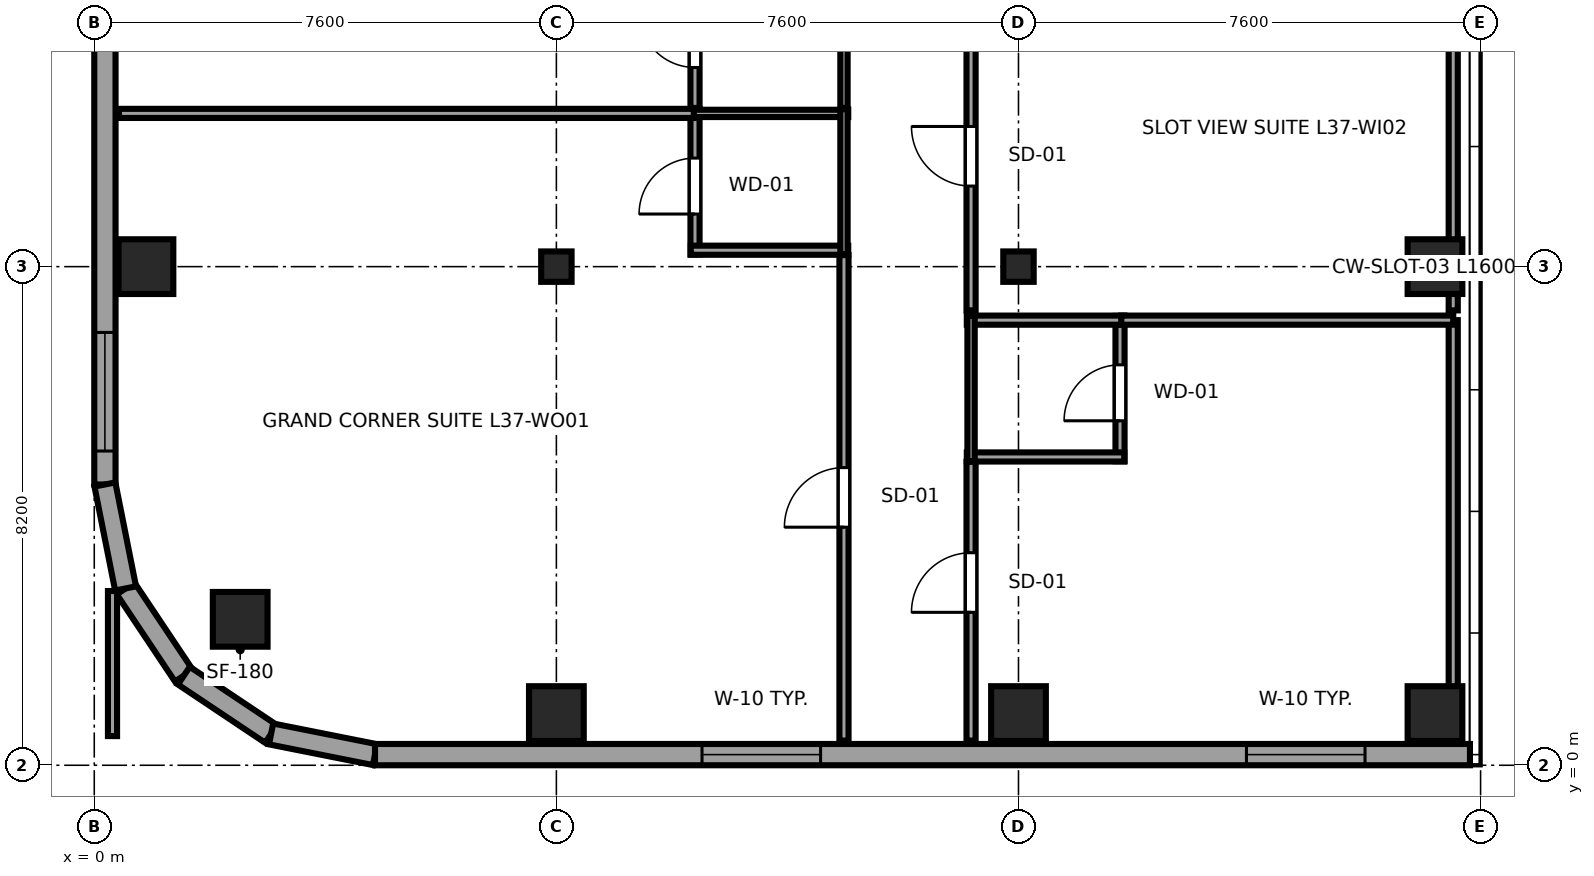
"""IFC4 building model, lengths in metres.
Left out: names, types, materials, properties, quantities, classifications, styles, units other than length and angle.
Written with IfcOpenShell. Run it as: python <this file> out.ifc"""

import sys

from ifc_helpers import new_model, si_unit, direction, frame, frame_2d, origin, origin_2d, place, context, subcontext, project, spatial, rectangle, i_section, extrude, source, transform, mapped, element, fill, save


model = new_model("IFC4")
c1 = context("Model", 3, precision=1e-05, world=origin(), true_north=direction((0.0, 1.0)))
c2 = subcontext(c1, "Body", "Model", "MODEL_VIEW")
j1 = project(units=[si_unit("LENGTHUNIT", "METRE"), si_unit("PLANEANGLEUNIT", "RADIAN")], contexts=[c1])
p1 = place(None, origin())
s1 = spatial("IfcSite", under=j1, at=p1, CompositionType="ELEMENT")
p2 = place(p1, origin())
s2 = spatial("IfcBuilding", under=s1, at=p2, CompositionType="ELEMENT")
p3 = place(p2, frame((0.0, 0.0, 143.5)))
s3 = spatial("IfcBuildingStorey", under=s2, at=p3, CompositionType="ELEMENT", Elevation=143.5)
m1 = source(origin(), c2, "Body", "SweptSolid", [
    extrude(rectangle(XDim=0.9, YDim=0.9, at=origin_2d()), origin(), (0.0, 0.0, 1.0), 3.55),
])
for number, where, z_axis, x_axis in (
    (1, (2.4, 2.4, 0.0), (0.0, 0.0, 1.0), (1.0, 0.0, 0.0)),
    (2, (0.85, 8.2, 0.0), (0.0, 0.0, 1.0), (1.0, 0.0, 0.0)),
    (3, (7.6, 0.85, 0.0), (0.0, 0.0, 1.0), (1.0, 0.0, 0.0)),
):
    element("IfcColumn", number, at=place(p3, frame(where, z_axis=z_axis, x_axis=x_axis)), inside=s3, PredefinedType="COLUMN", context=c2, shape_type="MappedRepresentation", body=[
        mapped(m1, transform((0.0, 0.0, 0.0), x_axis=(1.0, 0.0, 0.0), y_axis=(0.0, 1.0, 0.0), z_axis=(0.0, 0.0, 1.0), scale=1.0)),
    ])
m2 = source(origin(), c2, "Body", "SweptSolid", [
    extrude(i_section(OverallWidth=0.5, OverallDepth=0.5, WebThickness=0.022, FlangeThickness=0.034, at=origin_2d()), origin(), (0.0, 0.0, 1.0), 3.55),
])
p4 = place(p3, frame((7.6, 8.2, 0.0), z_axis=(0.0, 0.0, 1.0), x_axis=(1.0, 0.0, 0.0)))
e4 = element("IfcColumn", 4, at=p4, inside=s3, PredefinedType="COLUMN", context=c2, shape_type="MappedRepresentation", body=[
    mapped(m2, transform((0.0, 0.0, 0.0), x_axis=(1.0, 0.0, 0.0), y_axis=(0.0, 1.0, 0.0), z_axis=(0.0, 0.0, 1.0), scale=1.0)),
])
p5 = place(p3, frame((15.2, 0.85, 0.0), z_axis=(0.0, 0.0, 1.0), x_axis=(1.0, 0.0, 0.0)))
e5 = element("IfcColumn", 5, at=p5, inside=s3, PredefinedType="COLUMN", context=c2, shape_type="MappedRepresentation", body=[
    mapped(m1, transform((0.0, 0.0, 0.0), x_axis=(1.0, 0.0, 0.0), y_axis=(0.0, 1.0, 0.0), z_axis=(0.0, 0.0, 1.0), scale=1.0)),
])
p6 = place(p3, frame((15.2, 8.2, 0.0), z_axis=(0.0, 0.0, 1.0), x_axis=(1.0, 0.0, 0.0)))
e6 = element("IfcColumn", 6, at=p6, inside=s3, PredefinedType="COLUMN", context=c2, shape_type="MappedRepresentation", body=[
    mapped(m2, transform((0.0, 0.0, 0.0), x_axis=(1.0, 0.0, 0.0), y_axis=(0.0, 1.0, 0.0), z_axis=(0.0, 0.0, 1.0), scale=1.0)),
])
for number, where, z_axis, x_axis in (
    (7, (22.05, 0.85, 0.0), (0.0, 0.0, 1.0), (1.0, 0.0, 0.0)),
    (8, (22.05, 8.2, 0.0), (0.0, 0.0, 1.0), (1.0, 0.0, 0.0)),
):
    element("IfcColumn", number, at=place(p3, frame(where, z_axis=z_axis, x_axis=x_axis)), inside=s3, PredefinedType="COLUMN", context=c2, shape_type="MappedRepresentation", body=[
        mapped(m1, transform((0.0, 0.0, 0.0), x_axis=(1.0, 0.0, 0.0), y_axis=(0.0, 1.0, 0.0), z_axis=(0.0, 0.0, 1.0), scale=1.0)),
    ])
p7 = place(p3, frame((0.515, 2.908, 0.0), z_axis=(0.0, 0.0, 1.0), x_axis=(0.55554893791, -0.831483840845, 0.0)))
e9 = element("IfcWall", 9, at=p7, inside=s3, PredefinedType="SOLIDWALL", context=c2, shape_type="SweptSolid", body=[
    extrude(rectangle(XDim=1.725, YDim=0.35, at=frame_2d((0.863, 0.0))), origin(), (0.0, 0.0, 1.0), 2.08),
])
p8 = place(p3, frame((1.473, 1.473, 0.0), z_axis=(0.0, 0.0, 1.0), x_axis=(0.831483840845, -0.55554893791, 0.0)))
e10 = element("IfcWall", 10, at=p8, inside=s3, PredefinedType="SOLIDWALL", context=c2, shape_type="SweptSolid", body=[
    extrude(rectangle(XDim=1.725, YDim=0.35, at=frame_2d((0.863, 0.0))), origin(), (0.0, 0.0, 1.0), 3.29),
])
p9 = place(p3, frame((2.908, 0.515, 0.0), z_axis=(0.0, 0.0, 1.0), x_axis=(0.980800971659, -0.195011420161, 0.0)))
e11 = element("IfcWall", 11, at=p9, inside=s3, PredefinedType="SOLIDWALL", context=c2, shape_type="SweptSolid", body=[
    extrude(rectangle(XDim=1.743, YDim=0.35, at=frame_2d((0.871, 0.0))), origin(), (0.0, 0.0, 1.0), 3.29),
])
p10 = place(p3, frame((4.617, 0.175, 0.0), z_axis=(0.0, 0.0, 1.0), x_axis=(1.0, 0.0, 0.0)))
e12 = element("IfcWall", 12, at=p10, inside=s3, PredefinedType="SOLIDWALL", context=c2, shape_type="SweptSolid", body=[
    extrude(rectangle(XDim=18.008, YDim=0.35, at=frame_2d((9.004, 0.0))), origin(), (0.0, 0.0, 1.0), 3.29),
])
p11 = place(p10, frame((5.378, 0.0, 0.68)))
e13 = element("IfcOpeningElement", 13, at=p11, cuts=e12, PredefinedType="OPENING", context=c2, shape_type="SweptSolid", body=[
    extrude(rectangle(XDim=1.95, YDim=1.82, at=frame_2d((0.975, 0.91))), frame((0.0, 0.185, 0.0), z_axis=(0.0, -1.0, 0.0), x_axis=(1.0, 0.0, 0.0)), (0.0, 0.0, 1.0), 0.37),
])
p12 = place(p10, frame((14.332, 0.0, 0.68)))
e14 = element("IfcOpeningElement", 14, at=p12, cuts=e12, PredefinedType="OPENING", context=c2, shape_type="SweptSolid", body=[
    extrude(rectangle(XDim=1.95, YDim=1.82, at=frame_2d((0.975, 0.91))), frame((0.0, 0.185, 0.0), z_axis=(0.0, -1.0, 0.0), x_axis=(1.0, 0.0, 0.0)), (0.0, 0.0, 1.0), 0.37),
])
p13 = place(p3, frame((0.175, 41.383, 0.0), z_axis=(0.0, 0.0, 1.0), x_axis=(0.0, -1.0, 0.0)))
e15 = element("IfcWall", 15, at=p13, inside=s3, PredefinedType="SOLIDWALL", context=c2, shape_type="SweptSolid", body=[
    extrude(rectangle(XDim=36.766, YDim=0.35, at=frame_2d((18.383, 0.0))), origin(), (0.0, 0.0, 1.0), 3.29),
])
p14 = place(p13, frame((0.551, 0.0, 0.68)))
e16 = element("IfcOpeningElement", 16, at=p14, cuts=e15, PredefinedType="OPENING", context=c2, shape_type="SweptSolid", body=[
    extrude(rectangle(XDim=1.95, YDim=1.82, at=frame_2d((0.975, 0.91))), frame((0.0, 0.185, 0.0), z_axis=(0.0, -1.0, 0.0), x_axis=(1.0, 0.0, 0.0)), (0.0, 0.0, 1.0), 0.37),
])
p15 = place(p13, frame((4.503, 0.0, 0.68)))
e17 = element("IfcOpeningElement", 17, at=p15, cuts=e15, PredefinedType="OPENING", context=c2, shape_type="SweptSolid", body=[
    extrude(rectangle(XDim=1.95, YDim=1.82, at=frame_2d((0.975, 0.91))), frame((0.0, 0.185, 0.0), z_axis=(0.0, -1.0, 0.0), x_axis=(1.0, 0.0, 0.0)), (0.0, 0.0, 1.0), 0.37),
])
p16 = place(p13, frame((10.554, 0.0, 0.68)))
e18 = element("IfcOpeningElement", 18, at=p16, cuts=e15, PredefinedType="OPENING", context=c2, shape_type="SweptSolid", body=[
    extrude(rectangle(XDim=1.95, YDim=1.82, at=frame_2d((0.975, 0.91))), frame((0.0, 0.185, 0.0), z_axis=(0.0, -1.0, 0.0), x_axis=(1.0, 0.0, 0.0)), (0.0, 0.0, 1.0), 0.37),
])
p17 = place(p13, frame((13.456, 0.0, 0.68)))
e19 = element("IfcOpeningElement", 19, at=p17, cuts=e15, PredefinedType="OPENING", context=c2, shape_type="SweptSolid", body=[
    extrude(rectangle(XDim=1.95, YDim=1.82, at=frame_2d((0.975, 0.91))), frame((0.0, 0.185, 0.0), z_axis=(0.0, -1.0, 0.0), x_axis=(1.0, 0.0, 0.0)), (0.0, 0.0, 1.0), 0.37),
])
p18 = place(p13, frame((21.36, 0.0, 0.68)))
e20 = element("IfcOpeningElement", 20, at=p18, cuts=e15, PredefinedType="OPENING", context=c2, shape_type="SweptSolid", body=[
    extrude(rectangle(XDim=1.95, YDim=1.82, at=frame_2d((0.975, 0.91))), frame((0.0, 0.185, 0.0), z_axis=(0.0, -1.0, 0.0), x_axis=(1.0, 0.0, 0.0)), (0.0, 0.0, 1.0), 0.37),
])
p19 = place(p13, frame((26.361, 0.0, 0.68)))
e21 = element("IfcOpeningElement", 21, at=p19, cuts=e15, PredefinedType="OPENING", context=c2, shape_type="SweptSolid", body=[
    extrude(rectangle(XDim=1.95, YDim=1.82, at=frame_2d((0.975, 0.91))), frame((0.0, 0.185, 0.0), z_axis=(0.0, -1.0, 0.0), x_axis=(1.0, 0.0, 0.0)), (0.0, 0.0, 1.0), 0.37),
])
p20 = place(p13, frame((34.265, 0.0, 0.68)))
e22 = element("IfcOpeningElement", 22, at=p20, cuts=e15, PredefinedType="OPENING", context=c2, shape_type="SweptSolid", body=[
    extrude(rectangle(XDim=1.95, YDim=1.82, at=frame_2d((0.975, 0.91))), frame((0.0, 0.185, 0.0), z_axis=(0.0, -1.0, 0.0), x_axis=(1.0, 0.0, 0.0)), (0.0, 0.0, 1.0), 0.37),
])
p21 = place(p3, frame((0.175, 4.617, 0.0), z_axis=(0.0, 0.0, 1.0), x_axis=(0.195011420161, -0.980800971659, 0.0)))
e23 = element("IfcWall", 23, at=p21, inside=s3, PredefinedType="SOLIDWALL", context=c2, shape_type="SweptSolid", body=[
    extrude(rectangle(XDim=1.743, YDim=0.35, at=frame_2d((0.871, 0.0))), origin(), (0.0, 0.0, 1.0), 2.08),
])
p22 = place(p3, frame((9.88, 8.4, 0.0), z_axis=(0.0, 0.0, 1.0), x_axis=(0.0, 1.0, 0.0)))
e24 = element("IfcWall", 24, at=p22, inside=s3, PredefinedType="PARTITIONING", context=c2, shape_type="SweptSolid", body=[
    extrude(rectangle(XDim=2.39, YDim=0.15, at=frame_2d((1.195, 0.0))), origin(), (0.0, 0.0, 1.0), 3.29),
])
p23 = place(p22, frame((0.665, 0.0, 0.0)))
e25 = element("IfcOpeningElement", 25, at=p23, cuts=e24, PredefinedType="OPENING", context=c2, shape_type="SweptSolid", body=[
    extrude(rectangle(XDim=0.92, YDim=2.01, at=frame_2d((0.46, 1.005))), frame((0.0, 0.085, 0.0), z_axis=(0.0, -1.0, 0.0), x_axis=(1.0, 0.0, 0.0)), (0.0, 0.0, 1.0), 0.17),
])
p24 = place(p3, frame((9.81, 8.47, 0.0), z_axis=(0.0, 0.0, 1.0), x_axis=(1.0, 0.0, 0.0)))
e26 = element("IfcWall", 26, at=p24, inside=s3, PredefinedType="PARTITIONING", context=c2, shape_type="SweptSolid", body=[
    extrude(rectangle(XDim=2.59, YDim=0.15, at=frame_2d((1.295, 0.0))), origin(), (0.0, 0.0, 1.0), 2.08),
])
p25 = place(p3, frame((9.81, 10.72, 0.0), z_axis=(0.0, 0.0, 1.0), x_axis=(1.0, 0.0, 0.0)))
e27 = element("IfcWall", 27, at=p25, inside=s3, PredefinedType="PLUMBINGWALL", context=c2, shape_type="SweptSolid", body=[
    extrude(rectangle(XDim=2.59, YDim=0.12, at=frame_2d((1.295, 0.0))), origin(), (0.0, 0.0, 1.0), 3.29),
])
p26 = place(p3, frame((12.33, 8.4, 0.0), z_axis=(0.0, 0.0, 1.0), x_axis=(0.0, 1.0, 0.0)))
e28 = element("IfcWall", 28, at=p26, inside=s3, PredefinedType="PLUMBINGWALL", context=c2, shape_type="SweptSolid", body=[
    extrude(rectangle(XDim=2.39, YDim=0.12, at=frame_2d((1.195, 0.0))), origin(), (0.0, 0.0, 1.0), 3.29),
])
p27 = place(p3, frame((9.88, 10.81, 0.0), z_axis=(0.0, 0.0, 1.0), x_axis=(0.0, 1.0, 0.0)))
e29 = element("IfcWall", 29, at=p27, inside=s3, PredefinedType="PARTITIONING", context=c2, shape_type="SweptSolid", body=[
    extrude(rectangle(XDim=2.39, YDim=0.15, at=frame_2d((1.195, 0.0))), origin(), (0.0, 0.0, 1.0), 3.29),
])
p28 = place(p27, frame((0.665, 0.0, 0.0)))
e30 = element("IfcOpeningElement", 30, at=p28, cuts=e29, PredefinedType="OPENING", context=c2, shape_type="SweptSolid", body=[
    extrude(rectangle(XDim=0.92, YDim=2.01, at=frame_2d((0.46, 1.005))), frame((0.0, 0.085, 0.0), z_axis=(0.0, -1.0, 0.0), x_axis=(1.0, 0.0, 0.0)), (0.0, 0.0, 1.0), 0.17),
])
p29 = place(p3, frame((12.33, 10.81, 0.0), z_axis=(0.0, 0.0, 1.0), x_axis=(0.0, 1.0, 0.0)))
e31 = element("IfcWall", 31, at=p29, inside=s3, PredefinedType="PLUMBINGWALL", context=c2, shape_type="SweptSolid", body=[
    extrude(rectangle(XDim=2.39, YDim=0.12, at=frame_2d((1.195, 0.0))), origin(), (0.0, 0.0, 1.0), 3.29),
])
p30 = place(p3, frame((16.87, 5.0, 0.0), z_axis=(0.0, 0.0, 1.0), x_axis=(0.0, 1.0, 0.0)))
e32 = element("IfcWall", 32, at=p30, inside=s3, PredefinedType="PARTITIONING", context=c2, shape_type="SweptSolid", body=[
    extrude(rectangle(XDim=2.39, YDim=0.15, at=frame_2d((1.195, 0.0))), origin(), (0.0, 0.0, 1.0), 3.29),
])
p31 = place(p30, frame((0.665, 0.0, 0.0)))
e33 = element("IfcOpeningElement", 33, at=p31, cuts=e32, PredefinedType="OPENING", context=c2, shape_type="SweptSolid", body=[
    extrude(rectangle(XDim=0.92, YDim=2.01, at=frame_2d((0.46, 1.005))), frame((0.0, 0.085, 0.0), z_axis=(0.0, -1.0, 0.0), x_axis=(1.0, 0.0, 0.0)), (0.0, 0.0, 1.0), 0.17),
])
for number, where, z_axis, x_axis in (
    (34, (14.35, 5.07, 0.0), (0.0, 0.0, 1.0), (1.0, 0.0, 0.0)),
    (35, (14.35, 7.32, 0.0), (0.0, 0.0, 1.0), (1.0, 0.0, 0.0)),
):
    element("IfcWall", number, at=place(p3, frame(where, z_axis=z_axis, x_axis=x_axis)), inside=s3, PredefinedType="PARTITIONING", context=c2, shape_type="SweptSolid", body=[
        extrude(rectangle(XDim=2.59, YDim=0.15, at=frame_2d((1.295, 0.0))), origin(), (0.0, 0.0, 1.0), 3.29),
    ])
p32 = place(p3, frame((14.42, 5.0, 0.0), z_axis=(0.0, 0.0, 1.0), x_axis=(0.0, 1.0, 0.0)))
e36 = element("IfcWall", 36, at=p32, inside=s3, PredefinedType="PLUMBINGWALL", context=c2, shape_type="SweptSolid", body=[
    extrude(rectangle(XDim=2.39, YDim=0.12, at=frame_2d((1.195, 0.0))), origin(), (0.0, 0.0, 1.0), 3.29),
])
p33 = place(p3, frame((12.33, 0.405, 0.0), z_axis=(0.0, 0.0, 1.0), x_axis=(0.0, 1.0, 0.0)))
e37 = element("IfcWall", 37, at=p33, inside=s3, PredefinedType="PARTITIONING", context=c2, shape_type="SweptSolid", body=[
    extrude(rectangle(XDim=7.985, YDim=0.15, at=frame_2d((3.992, 0.0))), origin(), (0.0, 0.0, 1.0), 3.29),
])
p34 = place(p33, frame((3.51, 0.0, 0.0)))
e38 = element("IfcOpeningElement", 38, at=p34, cuts=e37, PredefinedType="OPENING", context=c2, shape_type="SweptSolid", body=[
    extrude(rectangle(XDim=0.98, YDim=2.12, at=frame_2d((0.49, 1.06))), frame((0.0, 0.085, 0.0), z_axis=(0.0, -1.0, 0.0), x_axis=(1.0, 0.0, 0.0)), (0.0, 0.0, 1.0), 0.17),
])
p35 = place(p3, frame((0.405, 10.72, 0.0), z_axis=(0.0, 0.0, 1.0), x_axis=(1.0, 0.0, 0.0)))
e39 = element("IfcWall", 39, at=p35, inside=s3, PredefinedType="PARTITIONING", context=c2, shape_type="SweptSolid", body=[
    extrude(rectangle(XDim=9.455, YDim=0.15, at=frame_2d((4.728, 0.0))), origin(), (0.0, 0.0, 1.0), 3.29),
])
p36 = place(p3, frame((0.3, 0.48, 0.0), z_axis=(0.0, 0.0, 1.0), x_axis=(0.0, 1.0, 0.0)))
e40 = element("IfcWall", 40, at=p36, inside=s3, PredefinedType="PARTITIONING", context=c2, shape_type="SweptSolid", body=[
    extrude(rectangle(XDim=2.385, YDim=0.15, at=frame_2d((1.192, 0.0))), origin(), (0.0, 0.0, 1.0), 3.29),
])
p37 = place(p3, frame((14.42, 0.405, 0.0), z_axis=(0.0, 0.0, 1.0), x_axis=(0.0, 1.0, 0.0)))
e41 = element("IfcWall", 41, at=p37, inside=s3, PredefinedType="PARTITIONING", context=c2, shape_type="SweptSolid", body=[
    extrude(rectangle(XDim=4.585, YDim=0.15, at=frame_2d((2.292, 0.0))), origin(), (0.0, 0.0, 1.0), 3.29),
])
p38 = place(p37, frame((2.11, 0.0, 0.0)))
e42 = element("IfcOpeningElement", 42, at=p38, cuts=e41, PredefinedType="OPENING", context=c2, shape_type="SweptSolid", body=[
    extrude(rectangle(XDim=0.98, YDim=2.12, at=frame_2d((0.49, 1.06))), frame((0.0, 0.085, 0.0), z_axis=(0.0, -1.0, 0.0), x_axis=(1.0, 0.0, 0.0)), (0.0, 0.0, 1.0), 0.17),
])
p39 = place(p3, frame((22.35, 0.405, 0.0), z_axis=(0.0, 0.0, 1.0), x_axis=(0.0, 1.0, 0.0)))
e43 = element("IfcWall", 43, at=p39, inside=s3, PredefinedType="PARTITIONING", context=c2, shape_type="SweptSolid", body=[
    extrude(rectangle(XDim=6.915, YDim=0.15, at=frame_2d((3.458, 0.0))), origin(), (0.0, 0.0, 1.0), 2.08),
])
p40 = place(p3, frame((16.89, 7.32, 0.0), z_axis=(0.0, 0.0, 1.0), x_axis=(1.0, 0.0, 0.0)))
e44 = element("IfcWall", 44, at=p40, inside=s3, PredefinedType="PARTITIONING", context=c2, shape_type="SweptSolid", body=[
    extrude(rectangle(XDim=5.46, YDim=0.15, at=frame_2d((2.73, 0.0))), origin(), (0.0, 0.0, 1.0), 3.29),
])
p41 = place(p3, frame((14.42, 7.48, 0.0), z_axis=(0.0, 0.0, 1.0), x_axis=(0.0, 1.0, 0.0)))
e45 = element("IfcWall", 45, at=p41, inside=s3, PredefinedType="PARTITIONING", context=c2, shape_type="SweptSolid", body=[
    extrude(rectangle(XDim=4.51, YDim=0.15, at=frame_2d((2.255, 0.0))), origin(), (0.0, 0.0, 1.0), 3.29),
])
p42 = place(p41, frame((2.045, 0.0, 0.0)))
e46 = element("IfcOpeningElement", 46, at=p42, cuts=e45, PredefinedType="OPENING", context=c2, shape_type="SweptSolid", body=[
    extrude(rectangle(XDim=0.98, YDim=2.12, at=frame_2d((0.49, 1.06))), frame((0.0, 0.085, 0.0), z_axis=(0.0, -1.0, 0.0), x_axis=(1.0, 0.0, 0.0)), (0.0, 0.0, 1.0), 0.17),
])
p43 = place(p3, frame((22.35, 7.48, 0.0), z_axis=(0.0, 0.0, 1.0), x_axis=(0.0, 1.0, 0.0)))
e47 = element("IfcWall", 47, at=p43, inside=s3, PredefinedType="PARTITIONING", context=c2, shape_type="SweptSolid", body=[
    extrude(rectangle(XDim=6.84, YDim=0.15, at=frame_2d((3.42, 0.0))), origin(), (0.0, 0.0, 1.0), 2.08),
])
m3 = source(origin(), c2, "Body", "SweptSolid", [
    extrude(rectangle(XDim=1.95, YDim=1.82, at=frame_2d((0.975, 0.91))), frame((0.0, 0.09, 0.0), z_axis=(0.0, -1.0, 0.0), x_axis=(1.0, 0.0, 0.0)), (0.0, 0.0, 1.0), 0.06),
])
p44 = place(p11, origin())
e48 = element("IfcWindow", 48, at=p44, inside=s3, PartitioningType="DOUBLE_PANEL_VERTICAL", PredefinedType="WINDOW", context=c2, shape_type="MappedRepresentation", body=[
    mapped(m3, transform((0.0, 0.0, 0.0), x_axis=(1.0, 0.0, 0.0), y_axis=(0.0, 1.0, 0.0), z_axis=(0.0, 0.0, 1.0), scale=1.0)),
])
fill(e13, e48)
p45 = place(p12, origin())
e49 = element("IfcWindow", 49, at=p45, inside=s3, PartitioningType="DOUBLE_PANEL_VERTICAL", PredefinedType="WINDOW", context=c2, shape_type="MappedRepresentation", body=[
    mapped(m3, transform((0.0, 0.0, 0.0), x_axis=(1.0, 0.0, 0.0), y_axis=(0.0, 1.0, 0.0), z_axis=(0.0, 0.0, 1.0), scale=1.0)),
])
fill(e14, e49)
p46 = place(p20, origin())
e50 = element("IfcWindow", 50, at=p46, inside=s3, PartitioningType="DOUBLE_PANEL_VERTICAL", PredefinedType="WINDOW", context=c2, shape_type="MappedRepresentation", body=[
    mapped(m3, transform((0.0, 0.0, 0.0), x_axis=(1.0, 0.0, 0.0), y_axis=(0.0, 1.0, 0.0), z_axis=(0.0, 0.0, 1.0), scale=1.0)),
])
fill(e22, e50)
m4 = source(origin(), c2, "Body", "SweptSolid", [
    extrude(rectangle(XDim=0.92, YDim=2.01, at=frame_2d((0.46, 1.005))), frame((0.0, 0.025, 0.0), z_axis=(0.0, -1.0, 0.0), x_axis=(1.0, 0.0, 0.0)), (0.0, 0.0, 1.0), 0.05),
])
p47 = place(p23, origin())
e51 = element("IfcDoor", 51, at=p47, inside=s3, OperationType="SINGLE_SWING_LEFT", PredefinedType="DOOR", context=c2, shape_type="MappedRepresentation", body=[
    mapped(m4, transform((0.0, 0.0, 0.0), x_axis=(1.0, 0.0, 0.0), y_axis=(0.0, 1.0, 0.0), z_axis=(0.0, 0.0, 1.0), scale=1.0)),
])
fill(e25, e51)
p48 = place(p28, origin())
e52 = element("IfcDoor", 52, at=p48, inside=s3, OperationType="SINGLE_SWING_RIGHT", PredefinedType="DOOR", context=c2, shape_type="MappedRepresentation", body=[
    mapped(m4, transform((0.0, 0.0, 0.0), x_axis=(1.0, 0.0, 0.0), y_axis=(0.0, 1.0, 0.0), z_axis=(0.0, 0.0, 1.0), scale=1.0)),
])
fill(e30, e52)
p49 = place(p31, origin())
e53 = element("IfcDoor", 53, at=p49, inside=s3, OperationType="SINGLE_SWING_LEFT", PredefinedType="DOOR", context=c2, shape_type="MappedRepresentation", body=[
    mapped(m4, transform((0.0, 0.0, 0.0), x_axis=(1.0, 0.0, 0.0), y_axis=(0.0, 1.0, 0.0), z_axis=(0.0, 0.0, 1.0), scale=1.0)),
])
fill(e33, e53)
m5 = source(origin(), c2, "Body", "SweptSolid", [
    extrude(rectangle(XDim=0.98, YDim=2.12, at=frame_2d((0.49, 1.06))), frame((0.0, 0.025, 0.0), z_axis=(0.0, -1.0, 0.0), x_axis=(1.0, 0.0, 0.0)), (0.0, 0.0, 1.0), 0.05),
])
p50 = place(p34, origin())
e54 = element("IfcDoor", 54, at=p50, inside=s3, OperationType="SINGLE_SWING_LEFT", PredefinedType="DOOR", context=c2, shape_type="MappedRepresentation", body=[
    mapped(m5, transform((0.0, 0.0, 0.0), x_axis=(1.0, 0.0, 0.0), y_axis=(0.0, 1.0, 0.0), z_axis=(0.0, 0.0, 1.0), scale=1.0)),
])
fill(e38, e54)
p51 = place(p38, origin())
e55 = element("IfcDoor", 55, at=p51, inside=s3, OperationType="SINGLE_SWING_LEFT", PredefinedType="DOOR", context=c2, shape_type="MappedRepresentation", body=[
    mapped(m5, transform((0.0, 0.0, 0.0), x_axis=(1.0, 0.0, 0.0), y_axis=(0.0, 1.0, 0.0), z_axis=(0.0, 0.0, 1.0), scale=1.0)),
])
fill(e42, e55)
p52 = place(p42, origin())
e56 = element("IfcDoor", 56, at=p52, inside=s3, OperationType="SINGLE_SWING_RIGHT", PredefinedType="DOOR", context=c2, shape_type="MappedRepresentation", body=[
    mapped(m5, transform((0.0, 0.0, 0.0), x_axis=(1.0, 0.0, 0.0), y_axis=(0.0, 1.0, 0.0), z_axis=(0.0, 0.0, 1.0), scale=1.0)),
])
fill(e46, e56)
save(model, sys.argv[1])
